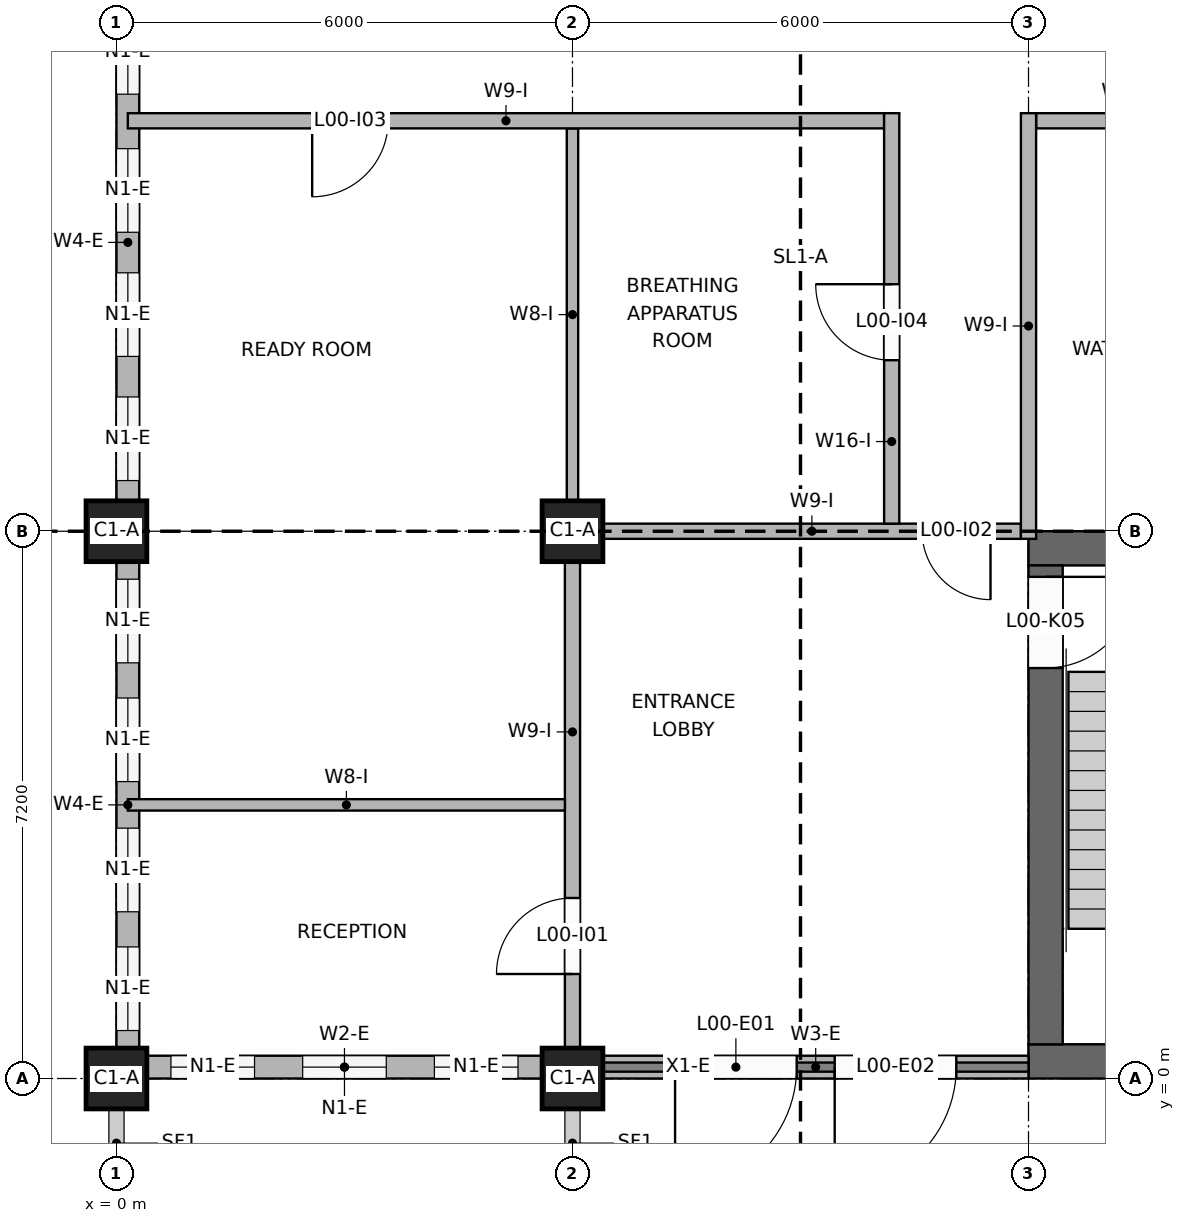
"""IFC4 building model, lengths in metres.
Left out: names, types, materials, properties, quantities, classifications, styles, units other than length and angle.
Written with IfcOpenShell. Run it as: python <this file> out.ifc"""

import sys

from ifc_helpers import new_model, si_unit, direction, frame, frame_2d, origin, origin_2d, place, context, subcontext, project, spatial, rectangle, extrude, element, fill, save


model = new_model("IFC4")
c1 = context("Model", 3, precision=1e-05, world=origin(), true_north=direction((0.0, 1.0)))
c2 = subcontext(c1, "Body", "Model", "MODEL_VIEW")
j1 = project(units=[si_unit("LENGTHUNIT", "METRE"), si_unit("PLANEANGLEUNIT", "RADIAN")], contexts=[c1])
p1 = place(None, origin())
s1 = spatial("IfcSite", under=j1, at=p1, CompositionType="ELEMENT")
p2 = place(p1, origin())
s2 = spatial("IfcBuilding", under=s1, at=p2, CompositionType="ELEMENT")
p3 = place(p2, origin())
s3 = spatial("IfcBuildingStorey", under=s2, at=p3, CompositionType="ELEMENT", Elevation=0.0)
p4 = place(p3, frame((12.0, 0.225, 0.0), z_axis=(0.0, 0.0, 1.0), x_axis=(1.0, 0.0, 0.0)))
e1 = element("IfcWall", 1, at=p4, inside=s3, PredefinedType="SHEAR", context=c2, shape_type="SweptSolid", body=[
    extrude(rectangle(XDim=5.4, YDim=0.45, at=frame_2d((2.7, 0.0))), origin(), (0.0, 0.0, 1.0), 4.0),
])
p5 = place(p4, frame((3.6, 0.0, 0.0)))
e2 = element("IfcOpeningElement", 2, at=p5, cuts=e1, PredefinedType="OPENING", context=c2, shape_type="SweptSolid", body=[
    extrude(rectangle(XDim=1.4, YDim=2.1, at=frame_2d((0.7, 1.05))), frame((0.0, 0.235, 0.0), z_axis=(0.0, -1.0, 0.0), x_axis=(1.0, 0.0, 0.0)), (0.0, 0.0, 1.0), 0.47),
])
p6 = place(p3, frame((12.0, 6.975, 0.0), z_axis=(0.0, 0.0, 1.0), x_axis=(1.0, 0.0, 0.0)))
e3 = element("IfcWall", 3, at=p6, inside=s3, PredefinedType="SHEAR", context=c2, shape_type="SweptSolid", body=[
    extrude(rectangle(XDim=5.4, YDim=0.45, at=frame_2d((2.7, 0.0))), origin(), (0.0, 0.0, 1.0), 4.0),
])
p7 = place(p3, frame((12.225, 0.45, 0.0), z_axis=(0.0, 0.0, 1.0), x_axis=(0.0, 1.0, 0.0)))
e4 = element("IfcWall", 4, at=p7, inside=s3, PredefinedType="SHEAR", context=c2, shape_type="SweptSolid", body=[
    extrude(rectangle(XDim=6.3, YDim=0.45, at=frame_2d((3.15, 0.0))), origin(), (0.0, 0.0, 1.0), 4.0),
])
p8 = place(p7, frame((4.95, 0.0, 0.0)))
e5 = element("IfcOpeningElement", 5, at=p8, cuts=e4, PredefinedType="OPENING", context=c2, shape_type="SweptSolid", body=[
    extrude(rectangle(XDim=1.2, YDim=2.1, at=frame_2d((0.6, 1.05))), frame((0.0, 0.235, 0.0), z_axis=(0.0, -1.0, 0.0), x_axis=(1.0, 0.0, 0.0)), (0.0, 0.0, 1.0), 0.47),
])
for number, where, z_axis, x_axis in (
    (6, (0.0, 0.0, -0.25), (0.0, 0.0, 1.0), (1.0, 0.0, 0.0)),
    (7, (6.0, 0.0, -0.25), (0.0, 0.0, 1.0), (1.0, 0.0, 0.0)),
    (8, (0.0, 7.2, -0.25), (0.0, 0.0, 1.0), (1.0, 0.0, 0.0)),
    (9, (6.0, 7.2, -0.25), (0.0, 0.0, 1.0), (1.0, 0.0, 0.0)),
):
    element("IfcColumn", number, at=place(p3, frame(where, z_axis=z_axis, x_axis=x_axis)), inside=s3, PredefinedType="COLUMN", context=c2, shape_type="SweptSolid", body=[
        extrude(rectangle(XDim=0.8, YDim=0.8, at=origin_2d()), origin(), (0.0, 0.0, 1.0), 4.25),
    ])
p9 = place(p3, frame((0.4, 0.15, 0.0), z_axis=(0.0, 0.0, 1.0), x_axis=(1.0, 0.0, 0.0)))
e10 = element("IfcWall", 10, at=p9, inside=s3, PredefinedType="SOLIDWALL", context=c2, shape_type="SweptSolid", body=[
    extrude(rectangle(XDim=5.2, YDim=0.3, at=frame_2d((2.6, 0.0))), origin(), (0.0, 0.0, 1.0), 3.2),
])
p10 = place(p9, frame((0.317, 0.0, 0.9)))
e11 = element("IfcOpeningElement", 11, at=p10, cuts=e10, PredefinedType="OPENING", context=c2, shape_type="SweptSolid", body=[
    extrude(rectangle(XDim=1.1, YDim=1.5, at=frame_2d((0.55, 0.75))), frame((0.0, 0.16, 0.0), z_axis=(0.0, -1.0, 0.0), x_axis=(1.0, 0.0, 0.0)), (0.0, 0.0, 1.0), 0.32),
])
p11 = place(p9, frame((2.05, 0.0, 0.9)))
e12 = element("IfcOpeningElement", 12, at=p11, cuts=e10, PredefinedType="OPENING", context=c2, shape_type="SweptSolid", body=[
    extrude(rectangle(XDim=1.1, YDim=1.5, at=frame_2d((0.55, 0.75))), frame((0.0, 0.16, 0.0), z_axis=(0.0, -1.0, 0.0), x_axis=(1.0, 0.0, 0.0)), (0.0, 0.0, 1.0), 0.32),
])
p12 = place(p9, frame((3.783, 0.0, 0.9)))
e13 = element("IfcOpeningElement", 13, at=p12, cuts=e10, PredefinedType="OPENING", context=c2, shape_type="SweptSolid", body=[
    extrude(rectangle(XDim=1.1, YDim=1.5, at=frame_2d((0.55, 0.75))), frame((0.0, 0.16, 0.0), z_axis=(0.0, -1.0, 0.0), x_axis=(1.0, 0.0, 0.0)), (0.0, 0.0, 1.0), 0.32),
])
p13 = place(p3, frame((6.4, 0.15, 0.0), z_axis=(0.0, 0.0, 1.0), x_axis=(1.0, 0.0, 0.0)))
e14 = element("IfcWall", 14, at=p13, inside=s3, PredefinedType="SOLIDWALL", context=c2, shape_type="SweptSolid", body=[
    extrude(rectangle(XDim=5.6, YDim=0.3, at=frame_2d((2.8, 0.0))), origin(), (0.0, 0.0, 1.0), 2.6),
])
p14 = place(p13, frame((0.95, 0.0, 0.0)))
e15 = element("IfcOpeningElement", 15, at=p14, cuts=e14, PredefinedType="OPENING", context=c2, shape_type="SweptSolid", body=[
    extrude(rectangle(XDim=1.6, YDim=2.4, at=frame_2d((0.8, 1.2))), frame((0.0, 0.16, 0.0), z_axis=(0.0, -1.0, 0.0), x_axis=(1.0, 0.0, 0.0)), (0.0, 0.0, 1.0), 0.32),
])
p15 = place(p13, frame((3.05, 0.0, 0.0)))
e16 = element("IfcOpeningElement", 16, at=p15, cuts=e14, PredefinedType="OPENING", context=c2, shape_type="SweptSolid", body=[
    extrude(rectangle(XDim=1.6, YDim=2.4, at=frame_2d((0.8, 1.2))), frame((0.0, 0.16, 0.0), z_axis=(0.0, -1.0, 0.0), x_axis=(1.0, 0.0, 0.0)), (0.0, 0.0, 1.0), 0.32),
])
p16 = place(p3, frame((0.15, 0.4, 0.0), z_axis=(0.0, 0.0, 1.0), x_axis=(0.0, 1.0, 0.0)))
e17 = element("IfcWall", 17, at=p16, inside=s3, PredefinedType="SOLIDWALL", context=c2, shape_type="SweptSolid", body=[
    extrude(rectangle(XDim=6.4, YDim=0.3, at=frame_2d((3.2, 0.0))), origin(), (0.0, 0.0, 1.0), 3.1),
])
p17 = place(p16, frame((0.231, 0.0, 0.9)))
e18 = element("IfcOpeningElement", 18, at=p17, cuts=e17, PredefinedType="OPENING", context=c2, shape_type="SweptSolid", body=[
    extrude(rectangle(XDim=1.1, YDim=1.5, at=frame_2d((0.55, 0.75))), frame((0.0, 0.16, 0.0), z_axis=(0.0, -1.0, 0.0), x_axis=(1.0, 0.0, 0.0)), (0.0, 0.0, 1.0), 0.32),
])
p18 = place(p16, frame((1.794, 0.0, 0.9)))
e19 = element("IfcOpeningElement", 19, at=p18, cuts=e17, PredefinedType="OPENING", context=c2, shape_type="SweptSolid", body=[
    extrude(rectangle(XDim=1.1, YDim=1.5, at=frame_2d((0.55, 0.75))), frame((0.0, 0.16, 0.0), z_axis=(0.0, -1.0, 0.0), x_axis=(1.0, 0.0, 0.0)), (0.0, 0.0, 1.0), 0.32),
])
p19 = place(p16, frame((3.506, 0.0, 0.9)))
e20 = element("IfcOpeningElement", 20, at=p19, cuts=e17, PredefinedType="OPENING", context=c2, shape_type="SweptSolid", body=[
    extrude(rectangle(XDim=1.1, YDim=1.5, at=frame_2d((0.55, 0.75))), frame((0.0, 0.16, 0.0), z_axis=(0.0, -1.0, 0.0), x_axis=(1.0, 0.0, 0.0)), (0.0, 0.0, 1.0), 0.32),
])
p20 = place(p16, frame((5.069, 0.0, 0.9)))
e21 = element("IfcOpeningElement", 21, at=p20, cuts=e17, PredefinedType="OPENING", context=c2, shape_type="SweptSolid", body=[
    extrude(rectangle(XDim=1.1, YDim=1.5, at=frame_2d((0.55, 0.75))), frame((0.0, 0.16, 0.0), z_axis=(0.0, -1.0, 0.0), x_axis=(1.0, 0.0, 0.0)), (0.0, 0.0, 1.0), 0.32),
])
p21 = place(p3, frame((0.15, 7.6, 0.0), z_axis=(0.0, 0.0, 1.0), x_axis=(0.0, 1.0, 0.0)))
e22 = element("IfcWall", 22, at=p21, inside=s3, PredefinedType="SOLIDWALL", context=c2, shape_type="SweptSolid", body=[
    extrude(rectangle(XDim=6.8, YDim=0.3, at=frame_2d((3.4, 0.0))), origin(), (0.0, 0.0, 1.0), 3.1),
])
p22 = place(p21, frame((0.267, 0.0, 0.9)))
e23 = element("IfcOpeningElement", 23, at=p22, cuts=e22, PredefinedType="OPENING", context=c2, shape_type="SweptSolid", body=[
    extrude(rectangle(XDim=1.1, YDim=1.5, at=frame_2d((0.55, 0.75))), frame((0.0, 0.16, 0.0), z_axis=(0.0, -1.0, 0.0), x_axis=(1.0, 0.0, 0.0)), (0.0, 0.0, 1.0), 0.32),
])
p23 = place(p21, frame((1.9, 0.0, 0.9)))
e24 = element("IfcOpeningElement", 24, at=p23, cuts=e22, PredefinedType="OPENING", context=c2, shape_type="SweptSolid", body=[
    extrude(rectangle(XDim=1.1, YDim=1.5, at=frame_2d((0.55, 0.75))), frame((0.0, 0.16, 0.0), z_axis=(0.0, -1.0, 0.0), x_axis=(1.0, 0.0, 0.0)), (0.0, 0.0, 1.0), 0.32),
])
p24 = place(p21, frame((3.533, 0.0, 0.9)))
e25 = element("IfcOpeningElement", 25, at=p24, cuts=e22, PredefinedType="OPENING", context=c2, shape_type="SweptSolid", body=[
    extrude(rectangle(XDim=1.1, YDim=1.5, at=frame_2d((0.55, 0.75))), frame((0.0, 0.16, 0.0), z_axis=(0.0, -1.0, 0.0), x_axis=(1.0, 0.0, 0.0)), (0.0, 0.0, 1.0), 0.32),
])
p25 = place(p21, frame((5.35, 0.0, 0.9)))
e26 = element("IfcOpeningElement", 26, at=p25, cuts=e22, PredefinedType="OPENING", context=c2, shape_type="SweptSolid", body=[
    extrude(rectangle(XDim=1.1, YDim=1.5, at=frame_2d((0.55, 0.75))), frame((0.0, 0.16, 0.0), z_axis=(0.0, -1.0, 0.0), x_axis=(1.0, 0.0, 0.0)), (0.0, 0.0, 1.0), 0.32),
])
p26 = place(p3, frame((6.0, 0.4, 0.0), z_axis=(0.0, 0.0, 1.0), x_axis=(0.0, 1.0, 0.0)))
e27 = element("IfcWall", 27, at=p26, inside=s3, PredefinedType="PARTITIONING", context=c2, shape_type="SweptSolid", body=[
    extrude(rectangle(XDim=6.4, YDim=0.2, at=frame_2d((3.2, 0.0))), origin(), (0.0, 0.0, 1.0), 3.1),
])
p27 = place(p26, frame((0.975, 0.0, 0.0)))
e28 = element("IfcOpeningElement", 28, at=p27, cuts=e27, PredefinedType="OPENING", context=c2, shape_type="SweptSolid", body=[
    extrude(rectangle(XDim=1.0, YDim=2.1, at=frame_2d((0.5, 1.05))), frame((0.0, 0.11, 0.0), z_axis=(0.0, -1.0, 0.0), x_axis=(1.0, 0.0, 0.0)), (0.0, 0.0, 1.0), 0.22),
])
p28 = place(p3, frame((6.0, 7.6, 0.0), z_axis=(0.0, 0.0, 1.0), x_axis=(0.0, 1.0, 0.0)))
e29 = element("IfcWall", 29, at=p28, inside=s3, PredefinedType="PARTITIONING", context=c2, shape_type="SweptSolid", body=[
    extrude(rectangle(XDim=4.9, YDim=0.15, at=frame_2d((2.45, 0.0))), origin(), (0.0, 0.0, 1.0), 3.1),
])
p29 = place(p3, frame((10.2, 7.3, 0.0), z_axis=(0.0, 0.0, 1.0), x_axis=(0.0, 1.0, 0.0)))
e30 = element("IfcWall", 30, at=p29, inside=s3, PredefinedType="PARTITIONING", context=c2, shape_type="SweptSolid", body=[
    extrude(rectangle(XDim=5.4, YDim=0.2, at=frame_2d((2.7, 0.0))), origin(), (0.0, 0.0, 1.0), 3.2),
])
p30 = place(p29, frame((2.15, 0.0, 0.0)))
e31 = element("IfcOpeningElement", 31, at=p30, cuts=e30, PredefinedType="OPENING", context=c2, shape_type="SweptSolid", body=[
    extrude(rectangle(XDim=1.0, YDim=2.1, at=frame_2d((0.5, 1.05))), frame((0.0, 0.11, 0.0), z_axis=(0.0, -1.0, 0.0), x_axis=(1.0, 0.0, 0.0)), (0.0, 0.0, 1.0), 0.22),
])
p31 = place(p3, frame((12.0, 7.1, 0.0), z_axis=(0.0, 0.0, 1.0), x_axis=(0.0, 1.0, 0.0)))
e32 = element("IfcWall", 32, at=p31, inside=s3, PredefinedType="PARTITIONING", context=c2, shape_type="SweptSolid", body=[
    extrude(rectangle(XDim=5.6, YDim=0.2, at=frame_2d((2.8, 0.0))), origin(), (0.0, 0.0, 1.0), 3.1),
])
p32 = place(p3, frame((0.15, 3.6, 0.0), z_axis=(0.0, 0.0, 1.0), x_axis=(1.0, 0.0, 0.0)))
e33 = element("IfcWall", 33, at=p32, inside=s3, PredefinedType="PARTITIONING", context=c2, shape_type="SweptSolid", body=[
    extrude(rectangle(XDim=5.75, YDim=0.15, at=frame_2d((2.875, 0.0))), origin(), (0.0, 0.0, 1.0), 3.1),
])
p33 = place(p3, frame((6.4, 7.2, 0.0), z_axis=(0.0, 0.0, 1.0), x_axis=(1.0, 0.0, 0.0)))
e34 = element("IfcWall", 34, at=p33, inside=s3, PredefinedType="PARTITIONING", context=c2, shape_type="SweptSolid", body=[
    extrude(rectangle(XDim=5.5, YDim=0.2, at=frame_2d((2.75, 0.0))), origin(), (0.0, 0.0, 1.0), 3.1),
])
p34 = place(p33, frame((4.2, 0.0, 0.0)))
e35 = element("IfcOpeningElement", 35, at=p34, cuts=e34, PredefinedType="OPENING", context=c2, shape_type="SweptSolid", body=[
    extrude(rectangle(XDim=0.9, YDim=2.1, at=frame_2d((0.45, 1.05))), frame((0.0, 0.11, 0.0), z_axis=(0.0, -1.0, 0.0), x_axis=(1.0, 0.0, 0.0)), (0.0, 0.0, 1.0), 0.22),
])
p35 = place(p3, frame((0.15, 12.6, 0.0), z_axis=(0.0, 0.0, 1.0), x_axis=(1.0, 0.0, 0.0)))
e36 = element("IfcWall", 36, at=p35, inside=s3, PredefinedType="PARTITIONING", context=c2, shape_type="SweptSolid", body=[
    extrude(rectangle(XDim=9.95, YDim=0.2, at=frame_2d((4.975, 0.0))), origin(), (0.0, 0.0, 1.0), 3.1),
])
p36 = place(p35, frame((2.425, 0.0, 0.0)))
e37 = element("IfcOpeningElement", 37, at=p36, cuts=e36, PredefinedType="OPENING", context=c2, shape_type="SweptSolid", body=[
    extrude(rectangle(XDim=1.0, YDim=2.1, at=frame_2d((0.5, 1.05))), frame((0.0, 0.11, 0.0), z_axis=(0.0, -1.0, 0.0), x_axis=(1.0, 0.0, 0.0)), (0.0, 0.0, 1.0), 0.22),
])
p37 = place(p3, frame((12.1, 12.6, 0.0), z_axis=(0.0, 0.0, 1.0), x_axis=(1.0, 0.0, 0.0)))
e38 = element("IfcWall", 38, at=p37, inside=s3, PredefinedType="PARTITIONING", context=c2, shape_type="SweptSolid", body=[
    extrude(rectangle(XDim=5.75, YDim=0.2, at=frame_2d((2.875, 0.0))), origin(), (0.0, 0.0, 1.0), 3.1),
])
p38 = place(p37, frame((2.375, 0.0, 0.0)))
e39 = element("IfcOpeningElement", 39, at=p38, cuts=e38, PredefinedType="OPENING", context=c2, shape_type="SweptSolid", body=[
    extrude(rectangle(XDim=1.0, YDim=2.1, at=frame_2d((0.5, 1.05))), frame((0.0, 0.11, 0.0), z_axis=(0.0, -1.0, 0.0), x_axis=(1.0, 0.0, 0.0)), (0.0, 0.0, 1.0), 0.22),
])
p39 = place(p10, origin())
e40 = element("IfcWindow", 40, at=p39, inside=s3, PartitioningType="SINGLE_PANEL", PredefinedType="WINDOW", context=c2, shape_type="SweptSolid", body=[
    extrude(rectangle(XDim=1.1, YDim=1.5, at=frame_2d((0.55, 0.75))), frame((0.0, 0.03, 0.0), z_axis=(0.0, -1.0, 0.0), x_axis=(1.0, 0.0, 0.0)), (0.0, 0.0, 1.0), 0.06),
])
fill(e11, e40)
p40 = place(p11, origin())
e41 = element("IfcWindow", 41, at=p40, inside=s3, PartitioningType="SINGLE_PANEL", PredefinedType="WINDOW", context=c2, shape_type="SweptSolid", body=[
    extrude(rectangle(XDim=1.1, YDim=1.5, at=frame_2d((0.55, 0.75))), frame((0.0, 0.03, 0.0), z_axis=(0.0, -1.0, 0.0), x_axis=(1.0, 0.0, 0.0)), (0.0, 0.0, 1.0), 0.06),
])
fill(e12, e41)
p41 = place(p12, origin())
e42 = element("IfcWindow", 42, at=p41, inside=s3, PartitioningType="SINGLE_PANEL", PredefinedType="WINDOW", context=c2, shape_type="SweptSolid", body=[
    extrude(rectangle(XDim=1.1, YDim=1.5, at=frame_2d((0.55, 0.75))), frame((0.0, 0.03, 0.0), z_axis=(0.0, -1.0, 0.0), x_axis=(1.0, 0.0, 0.0)), (0.0, 0.0, 1.0), 0.06),
])
fill(e13, e42)
p42 = place(p14, frame((1.6, 0.0, 0.0), z_axis=(0.0, 0.0, 1.0), x_axis=(-1.0, 0.0, 0.0)))
e43 = element("IfcDoor", 43, at=p42, inside=s3, OperationType="SINGLE_SWING_RIGHT", PredefinedType="DOOR", context=c2, shape_type="SweptSolid", body=[
    extrude(rectangle(XDim=1.6, YDim=2.4, at=frame_2d((0.8, 1.2))), frame((0.0, 0.025, 0.0), z_axis=(0.0, -1.0, 0.0), x_axis=(1.0, 0.0, 0.0)), (0.0, 0.0, 1.0), 0.05),
])
fill(e15, e43)
p43 = place(p15, frame((1.6, 0.0, 0.0), z_axis=(0.0, 0.0, 1.0), x_axis=(-1.0, 0.0, 0.0)))
e44 = element("IfcDoor", 44, at=p43, inside=s3, OperationType="SINGLE_SWING_RIGHT", PredefinedType="DOOR", context=c2, shape_type="SweptSolid", body=[
    extrude(rectangle(XDim=1.6, YDim=2.4, at=frame_2d((0.8, 1.2))), frame((0.0, 0.025, 0.0), z_axis=(0.0, -1.0, 0.0), x_axis=(1.0, 0.0, 0.0)), (0.0, 0.0, 1.0), 0.05),
])
fill(e16, e44)
p44 = place(p17, origin())
e45 = element("IfcWindow", 45, at=p44, inside=s3, PartitioningType="SINGLE_PANEL", PredefinedType="WINDOW", context=c2, shape_type="SweptSolid", body=[
    extrude(rectangle(XDim=1.1, YDim=1.5, at=frame_2d((0.55, 0.75))), frame((0.0, 0.03, 0.0), z_axis=(0.0, -1.0, 0.0), x_axis=(1.0, 0.0, 0.0)), (0.0, 0.0, 1.0), 0.06),
])
fill(e18, e45)
p45 = place(p18, origin())
e46 = element("IfcWindow", 46, at=p45, inside=s3, PartitioningType="SINGLE_PANEL", PredefinedType="WINDOW", context=c2, shape_type="SweptSolid", body=[
    extrude(rectangle(XDim=1.1, YDim=1.5, at=frame_2d((0.55, 0.75))), frame((0.0, 0.03, 0.0), z_axis=(0.0, -1.0, 0.0), x_axis=(1.0, 0.0, 0.0)), (0.0, 0.0, 1.0), 0.06),
])
fill(e19, e46)
p46 = place(p19, origin())
e47 = element("IfcWindow", 47, at=p46, inside=s3, PartitioningType="SINGLE_PANEL", PredefinedType="WINDOW", context=c2, shape_type="SweptSolid", body=[
    extrude(rectangle(XDim=1.1, YDim=1.5, at=frame_2d((0.55, 0.75))), frame((0.0, 0.03, 0.0), z_axis=(0.0, -1.0, 0.0), x_axis=(1.0, 0.0, 0.0)), (0.0, 0.0, 1.0), 0.06),
])
fill(e20, e47)
p47 = place(p20, origin())
e48 = element("IfcWindow", 48, at=p47, inside=s3, PartitioningType="SINGLE_PANEL", PredefinedType="WINDOW", context=c2, shape_type="SweptSolid", body=[
    extrude(rectangle(XDim=1.1, YDim=1.5, at=frame_2d((0.55, 0.75))), frame((0.0, 0.03, 0.0), z_axis=(0.0, -1.0, 0.0), x_axis=(1.0, 0.0, 0.0)), (0.0, 0.0, 1.0), 0.06),
])
fill(e21, e48)
p48 = place(p22, origin())
e49 = element("IfcWindow", 49, at=p48, inside=s3, PartitioningType="SINGLE_PANEL", PredefinedType="WINDOW", context=c2, shape_type="SweptSolid", body=[
    extrude(rectangle(XDim=1.1, YDim=1.5, at=frame_2d((0.55, 0.75))), frame((0.0, 0.03, 0.0), z_axis=(0.0, -1.0, 0.0), x_axis=(1.0, 0.0, 0.0)), (0.0, 0.0, 1.0), 0.06),
])
fill(e23, e49)
p49 = place(p23, origin())
e50 = element("IfcWindow", 50, at=p49, inside=s3, PartitioningType="SINGLE_PANEL", PredefinedType="WINDOW", context=c2, shape_type="SweptSolid", body=[
    extrude(rectangle(XDim=1.1, YDim=1.5, at=frame_2d((0.55, 0.75))), frame((0.0, 0.03, 0.0), z_axis=(0.0, -1.0, 0.0), x_axis=(1.0, 0.0, 0.0)), (0.0, 0.0, 1.0), 0.06),
])
fill(e24, e50)
p50 = place(p24, origin())
e51 = element("IfcWindow", 51, at=p50, inside=s3, PartitioningType="SINGLE_PANEL", PredefinedType="WINDOW", context=c2, shape_type="SweptSolid", body=[
    extrude(rectangle(XDim=1.1, YDim=1.5, at=frame_2d((0.55, 0.75))), frame((0.0, 0.03, 0.0), z_axis=(0.0, -1.0, 0.0), x_axis=(1.0, 0.0, 0.0)), (0.0, 0.0, 1.0), 0.06),
])
fill(e25, e51)
p51 = place(p25, origin())
e52 = element("IfcWindow", 52, at=p51, inside=s3, PartitioningType="SINGLE_PANEL", PredefinedType="WINDOW", context=c2, shape_type="SweptSolid", body=[
    extrude(rectangle(XDim=1.1, YDim=1.5, at=frame_2d((0.55, 0.75))), frame((0.0, 0.03, 0.0), z_axis=(0.0, -1.0, 0.0), x_axis=(1.0, 0.0, 0.0)), (0.0, 0.0, 1.0), 0.06),
])
fill(e26, e52)
p52 = place(p8, frame((1.2, 0.0, 0.0), z_axis=(0.0, 0.0, 1.0), x_axis=(-1.0, 0.0, 0.0)))
e53 = element("IfcDoor", 53, at=p52, inside=s3, OperationType="SINGLE_SWING_LEFT", PredefinedType="DOOR", context=c2, shape_type="SweptSolid", body=[
    extrude(rectangle(XDim=1.2, YDim=2.1, at=frame_2d((0.6, 1.05))), frame((0.0, 0.025, 0.0), z_axis=(0.0, -1.0, 0.0), x_axis=(1.0, 0.0, 0.0)), (0.0, 0.0, 1.0), 0.05),
])
fill(e5, e53)
p53 = place(p27, origin())
e54 = element("IfcDoor", 54, at=p53, inside=s3, OperationType="SINGLE_SWING_LEFT", PredefinedType="DOOR", context=c2, shape_type="SweptSolid", body=[
    extrude(rectangle(XDim=1.0, YDim=2.1, at=frame_2d((0.5, 1.05))), frame((0.0, 0.025, 0.0), z_axis=(0.0, -1.0, 0.0), x_axis=(1.0, 0.0, 0.0)), (0.0, 0.0, 1.0), 0.05),
])
fill(e28, e54)
p54 = place(p34, frame((0.9, 0.0, 0.0), z_axis=(0.0, 0.0, 1.0), x_axis=(-1.0, 0.0, 0.0)))
e55 = element("IfcDoor", 55, at=p54, inside=s3, OperationType="SINGLE_SWING_LEFT", PredefinedType="DOOR", context=c2, shape_type="SweptSolid", body=[
    extrude(rectangle(XDim=0.9, YDim=2.1, at=frame_2d((0.45, 1.05))), frame((0.0, 0.025, 0.0), z_axis=(0.0, -1.0, 0.0), x_axis=(1.0, 0.0, 0.0)), (0.0, 0.0, 1.0), 0.05),
])
fill(e35, e55)
p55 = place(p36, frame((1.0, 0.0, 0.0), z_axis=(0.0, 0.0, 1.0), x_axis=(-1.0, 0.0, 0.0)))
e56 = element("IfcDoor", 56, at=p55, inside=s3, OperationType="SINGLE_SWING_RIGHT", PredefinedType="DOOR", context=c2, shape_type="SweptSolid", body=[
    extrude(rectangle(XDim=1.0, YDim=2.1, at=frame_2d((0.5, 1.05))), frame((0.0, 0.025, 0.0), z_axis=(0.0, -1.0, 0.0), x_axis=(1.0, 0.0, 0.0)), (0.0, 0.0, 1.0), 0.05),
])
fill(e37, e56)
p56 = place(p30, origin())
e57 = element("IfcDoor", 57, at=p56, inside=s3, OperationType="SINGLE_SWING_RIGHT", PredefinedType="DOOR", context=c2, shape_type="SweptSolid", body=[
    extrude(rectangle(XDim=1.0, YDim=2.1, at=frame_2d((0.5, 1.05))), frame((0.0, 0.025, 0.0), z_axis=(0.0, -1.0, 0.0), x_axis=(1.0, 0.0, 0.0)), (0.0, 0.0, 1.0), 0.05),
])
fill(e31, e57)
save(model, sys.argv[1])
